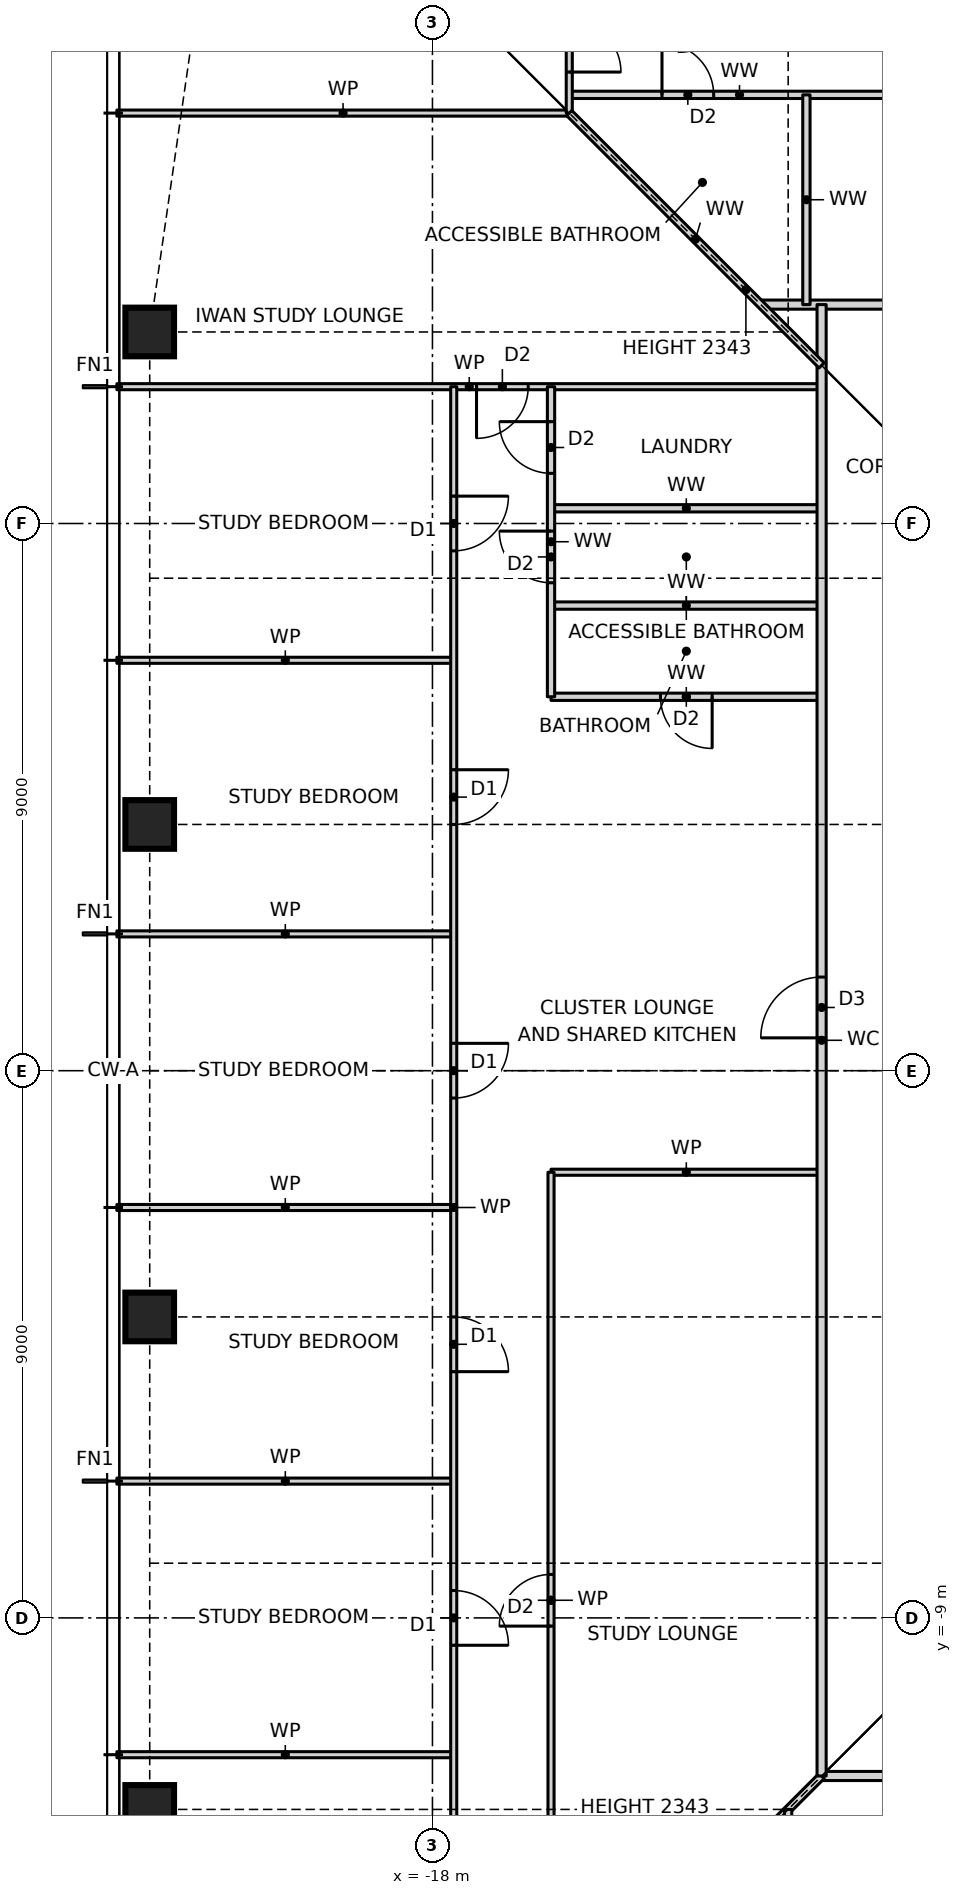
"""IFC4 building model, lengths in metres.
Left out: names, types, materials, properties, quantities, classifications, styles, units other than length and angle.
Written with IfcOpenShell. Run it as: python <this file> out.ifc"""

import sys

from ifc_helpers import new_model, si_unit, direction, frame, frame_2d, origin, origin_2d, place, context, subcontext, project, spatial, rectangle, hollow_rectangle, extrude, element, fill, save


model = new_model("IFC4")
c1 = context("Model", 3, precision=1e-05, world=origin(), true_north=direction((0.0, 1.0)))
c2 = subcontext(c1, "Body", "Model", "MODEL_VIEW")
j1 = project(units=[si_unit("LENGTHUNIT", "METRE"), si_unit("PLANEANGLEUNIT", "RADIAN")], contexts=[c1])
p1 = place(None, origin())
s1 = spatial("IfcSite", under=j1, at=p1, CompositionType="ELEMENT")
p2 = place(p1, origin())
s2 = spatial("IfcBuilding", under=s1, at=p2, CompositionType="ELEMENT")
p3 = place(p2, frame((0.0, 0.0, 36.0)))
s3 = spatial("IfcBuildingStorey", under=s2, at=p3, CompositionType="ELEMENT", Elevation=36.0)
for number, where, z_axis, x_axis in (
    (1, (-22.65, 12.15, 0.0), (0.0, 0.0, 1.0), (1.0, 0.0, 0.0)),
    (2, (-22.65, 4.05, 0.0), (0.0, 0.0, 1.0), (1.0, 0.0, 0.0)),
    (3, (-22.65, -4.05, 0.0), (0.0, 0.0, 1.0), (1.0, 0.0, 0.0)),
    (4, (-22.65, -12.15, 0.0), (0.0, 0.0, 1.0), (1.0, 0.0, 0.0)),
):
    element("IfcColumn", number, at=place(p3, frame(where, z_axis=z_axis, x_axis=x_axis)), inside=s3, PredefinedType="COLUMN", context=c2, shape_type="SweptSolid", body=[
        extrude(hollow_rectangle(XDim=0.8, YDim=0.8, WallThickness=0.09, at=origin_2d()), origin(), (0.0, 0.0, 1.0), 3.5),
    ])
p4 = place(p3, frame((-11.6, -11.6, 0.0), z_axis=(0.0, 0.0, 1.0), x_axis=(1.0, 0.0, 0.0)))
e5 = element("IfcWall", 5, at=p4, inside=s3, PredefinedType="PARTITIONING", context=c2, shape_type="SweptSolid", body=[
    extrude(rectangle(XDim=23.2, YDim=0.15, at=frame_2d((11.6, 0.0))), origin(), (0.0, 0.0, 1.0), 3.27),
])
p5 = place(p4, frame((2.975, 0.0, 0.0)))
e6 = element("IfcOpeningElement", 6, at=p5, cuts=e5, PredefinedType="OPENING", context=c2, shape_type="SweptSolid", body=[
    extrude(rectangle(XDim=1.0, YDim=2.1, at=frame_2d((0.5, 1.05))), frame((0.0, 0.085, 0.0), z_axis=(0.0, -1.0, 0.0), x_axis=(1.0, 0.0, 0.0)), (0.0, 0.0, 1.0), 0.17),
])
p6 = place(p4, frame((18.6, 0.0, 0.0)))
e7 = element("IfcOpeningElement", 7, at=p6, cuts=e5, PredefinedType="OPENING", context=c2, shape_type="SweptSolid", body=[
    extrude(rectangle(XDim=1.0, YDim=2.1, at=frame_2d((0.5, 1.05))), frame((0.0, 0.085, 0.0), z_axis=(0.0, -1.0, 0.0), x_axis=(1.0, 0.0, 0.0)), (0.0, 0.0, 1.0), 0.17),
])
for number, where, z_axis, x_axis in (
    (8, (-23.19, -11.25, 0.0), (0.0, 0.0, 1.0), (1.0, 0.0, 0.0)),
    (9, (-23.19, -6.75, 0.0), (0.0, 0.0, 1.0), (1.0, 0.0, 0.0)),
    (10, (-23.19, -2.25, 0.0), (0.0, 0.0, 1.0), (1.0, 0.0, 0.0)),
):
    element("IfcWall", number, at=place(p3, frame(where, z_axis=z_axis, x_axis=x_axis)), inside=s3, PredefinedType="PARTITIONING", context=c2, shape_type="SweptSolid", body=[
        extrude(rectangle(XDim=5.54, YDim=0.1, at=frame_2d((2.77, 0.0))), origin(), (0.0, 0.0, 1.0), 3.27),
    ])
p7 = place(p3, frame((-16.05, -1.67, 0.0), z_axis=(0.0, 0.0, 1.0), x_axis=(1.0, 0.0, 0.0)))
e11 = element("IfcWall", 11, at=p7, inside=s3, PredefinedType="PARTITIONING", context=c2, shape_type="SweptSolid", body=[
    extrude(rectangle(XDim=4.45, YDim=0.1, at=frame_2d((2.225, 0.0))), origin(), (0.0, 0.0, 1.0), 3.27),
])
p8 = place(p3, frame((-23.19, 2.25, 0.0), z_axis=(0.0, 0.0, 1.0), x_axis=(1.0, 0.0, 0.0)))
e12 = element("IfcWall", 12, at=p8, inside=s3, PredefinedType="PARTITIONING", context=c2, shape_type="SweptSolid", body=[
    extrude(rectangle(XDim=5.54, YDim=0.1, at=frame_2d((2.77, 0.0))), origin(), (0.0, 0.0, 1.0), 3.27),
])
p9 = place(p3, frame((-16.05, 6.15, 0.0), z_axis=(0.0, 0.0, 1.0), x_axis=(1.0, 0.0, 0.0)))
e13 = element("IfcWall", 13, at=p9, inside=s3, PredefinedType="PARTITIONING", context=c2, shape_type="SweptSolid", body=[
    extrude(rectangle(XDim=4.45, YDim=0.12, at=frame_2d((2.225, 0.0))), origin(), (0.0, 0.0, 1.0), 3.27),
])
p10 = place(p9, frame((1.8, 0.0, 0.0)))
e14 = element("IfcOpeningElement", 14, at=p10, cuts=e13, PredefinedType="OPENING", context=c2, shape_type="SweptSolid", body=[
    extrude(rectangle(XDim=0.85, YDim=2.1, at=frame_2d((0.425, 1.05))), frame((0.0, 0.07, 0.0), z_axis=(0.0, -1.0, 0.0), x_axis=(1.0, 0.0, 0.0)), (0.0, 0.0, 1.0), 0.14),
])
p11 = place(p3, frame((-23.19, 6.75, 0.0), z_axis=(0.0, 0.0, 1.0), x_axis=(1.0, 0.0, 0.0)))
e15 = element("IfcWall", 15, at=p11, inside=s3, PredefinedType="PARTITIONING", context=c2, shape_type="SweptSolid", body=[
    extrude(rectangle(XDim=5.54, YDim=0.1, at=frame_2d((2.77, 0.0))), origin(), (0.0, 0.0, 1.0), 3.27),
])
for number, where, z_axis, x_axis in (
    (16, (-16.05, 7.65, 0.0), (0.0, 0.0, 1.0), (1.0, 0.0, 0.0)),
    (17, (-16.05, 9.25, 0.0), (0.0, 0.0, 1.0), (1.0, 0.0, 0.0)),
):
    element("IfcWall", number, at=place(p3, frame(where, z_axis=z_axis, x_axis=x_axis)), inside=s3, PredefinedType="PARTITIONING", context=c2, shape_type="SweptSolid", body=[
        extrude(rectangle(XDim=4.45, YDim=0.12, at=frame_2d((2.225, 0.0))), origin(), (0.0, 0.0, 1.0), 3.27),
    ])
p12 = place(p3, frame((-23.19, 11.25, 0.0), z_axis=(0.0, 0.0, 1.0), x_axis=(1.0, 0.0, 0.0)))
e18 = element("IfcWall", 18, at=p12, inside=s3, PredefinedType="PARTITIONING", context=c2, shape_type="SweptSolid", body=[
    extrude(rectangle(XDim=11.59, YDim=0.1, at=frame_2d((5.795, 0.0))), origin(), (0.0, 0.0, 1.0), 3.27),
])
p13 = place(p12, frame((5.915, 0.0, 0.0)))
e19 = element("IfcOpeningElement", 19, at=p13, cuts=e18, PredefinedType="OPENING", context=c2, shape_type="SweptSolid", body=[
    extrude(rectangle(XDim=0.85, YDim=2.1, at=frame_2d((0.425, 1.05))), frame((0.0, 0.06, 0.0), z_axis=(0.0, -1.0, 0.0), x_axis=(1.0, 0.0, 0.0)), (0.0, 0.0, 1.0), 0.12),
])
p14 = place(p3, frame((-12.6, 12.6, 0.0), z_axis=(0.0, 0.0, 1.0), x_axis=(1.0, 0.0, 0.0)))
e20 = element("IfcWall", 20, at=p14, inside=s3, PredefinedType="PARTITIONING", context=c2, shape_type="SweptSolid", body=[
    extrude(rectangle(XDim=25.2, YDim=0.15, at=frame_2d((12.6, 0.0))), origin(), (0.0, 0.0, 1.0), 3.27),
])
p15 = place(p14, frame((3.15, 0.0, 0.0)))
e21 = element("IfcOpeningElement", 21, at=p15, cuts=e20, PredefinedType="OPENING", context=c2, shape_type="SweptSolid", body=[
    extrude(rectangle(XDim=1.0, YDim=2.1, at=frame_2d((0.5, 1.05))), frame((0.0, 0.085, 0.0), z_axis=(0.0, -1.0, 0.0), x_axis=(1.0, 0.0, 0.0)), (0.0, 0.0, 1.0), 0.17),
])
p16 = place(p3, frame((-23.19, 15.75, 0.0), z_axis=(0.0, 0.0, 1.0), x_axis=(1.0, 0.0, 0.0)))
e22 = element("IfcWall", 22, at=p16, inside=s3, PredefinedType="PARTITIONING", context=c2, shape_type="SweptSolid", body=[
    extrude(rectangle(XDim=7.44, YDim=0.1, at=frame_2d((3.72, 0.0))), origin(), (0.0, 0.0, 1.0), 3.27),
])
p17 = place(p3, frame((-15.75, 16.05, 0.0), z_axis=(0.0, 0.0, 1.0), x_axis=(1.0, 0.0, 0.0)))
e23 = element("IfcWall", 23, at=p17, inside=s3, PredefinedType="PARTITIONING", context=c2, shape_type="SweptSolid", body=[
    extrude(rectangle(XDim=5.6, YDim=0.12, at=frame_2d((2.8, 0.0))), origin(), (0.0, 0.0, 1.0), 3.27),
])
p18 = place(p17, frame((1.525, 0.0, 0.0)))
e24 = element("IfcOpeningElement", 24, at=p18, cuts=e23, PredefinedType="OPENING", context=c2, shape_type="SweptSolid", body=[
    extrude(rectangle(XDim=0.85, YDim=2.1, at=frame_2d((0.425, 1.05))), frame((0.0, 0.07, 0.0), z_axis=(0.0, -1.0, 0.0), x_axis=(1.0, 0.0, 0.0)), (0.0, 0.0, 1.0), 0.14),
])
p19 = place(p3, frame((-15.75, -15.75, 0.0), z_axis=(0.0, 0.0, 1.0), x_axis=(0.707106781187, 0.707106781187, 0.0)))
e25 = element("IfcWall", 25, at=p19, inside=s3, PredefinedType="PARTITIONING", context=c2, shape_type="SweptSolid", body=[
    extrude(rectangle(XDim=5.869, YDim=0.12, at=frame_2d((2.935, 0.0))), origin(), (0.0, 0.0, 1.0), 2.343),
])
p20 = place(p3, frame((-11.6, -11.6, 0.0), z_axis=(0.0, 0.0, 1.0), x_axis=(0.0, 1.0, 0.0)))
e26 = element("IfcWall", 26, at=p20, inside=s3, PredefinedType="PARTITIONING", context=c2, shape_type="SweptSolid", body=[
    extrude(rectangle(XDim=24.2, YDim=0.15, at=frame_2d((12.1, 0.0))), origin(), (0.0, 0.0, 1.0), 3.27),
])
p21 = place(p20, frame((12.14, 0.0, 0.0)))
e27 = element("IfcOpeningElement", 27, at=p21, cuts=e26, PredefinedType="OPENING", context=c2, shape_type="SweptSolid", body=[
    extrude(rectangle(XDim=1.0, YDim=2.1, at=frame_2d((0.5, 1.05))), frame((0.0, 0.085, 0.0), z_axis=(0.0, -1.0, 0.0), x_axis=(1.0, 0.0, 0.0)), (0.0, 0.0, 1.0), 0.17),
])
p22 = place(p3, frame((-11.85, 12.6, 0.0), z_axis=(0.0, 0.0, 1.0), x_axis=(0.0, 1.0, 0.0)))
e28 = element("IfcWall", 28, at=p22, inside=s3, PredefinedType="PARTITIONING", context=c2, shape_type="SweptSolid", body=[
    extrude(rectangle(XDim=3.45, YDim=0.12, at=frame_2d((1.725, 0.0))), origin(), (0.0, 0.0, 1.0), 3.27),
])
p23 = place(p3, frame((-12.15, -16.05, 0.0), z_axis=(0.0, 0.0, 1.0), x_axis=(0.0, 1.0, 0.0)))
e29 = element("IfcWall", 29, at=p23, inside=s3, PredefinedType="PARTITIONING", context=c2, shape_type="SweptSolid", body=[
    extrude(rectangle(XDim=3.9, YDim=0.12, at=frame_2d((1.95, 0.0))), origin(), (0.0, 0.0, 1.0), 2.508),
])
p24 = place(p23, frame((1.525, 0.0, 0.0)))
e30 = element("IfcOpeningElement", 30, at=p24, cuts=e29, PredefinedType="OPENING", context=c2, shape_type="SweptSolid", body=[
    extrude(rectangle(XDim=0.85, YDim=2.1, at=frame_2d((0.425, 1.05))), frame((0.0, 0.07, 0.0), z_axis=(0.0, -1.0, 0.0), x_axis=(1.0, 0.0, 0.0)), (0.0, 0.0, 1.0), 0.14),
])
p25 = place(p3, frame((-15.75, 15.75, 0.0), z_axis=(0.0, 0.0, 1.0), x_axis=(0.0, 1.0, 0.0)))
e31 = element("IfcWall", 31, at=p25, inside=s3, PredefinedType="PARTITIONING", context=c2, shape_type="SweptSolid", body=[
    extrude(rectangle(XDim=7.44, YDim=0.1, at=frame_2d((3.72, 0.0))), origin(), (0.0, 0.0, 1.0), 3.27),
])
p26 = place(p25, frame((0.675, 0.0, 0.0)))
e32 = element("IfcOpeningElement", 32, at=p26, cuts=e31, PredefinedType="OPENING", context=c2, shape_type="SweptSolid", body=[
    extrude(rectangle(XDim=0.85, YDim=2.1, at=frame_2d((0.425, 1.05))), frame((0.0, 0.06, 0.0), z_axis=(0.0, -1.0, 0.0), x_axis=(1.0, 0.0, 0.0)), (0.0, 0.0, 1.0), 0.12),
])
p27 = place(p3, frame((-16.05, -15.75, 0.0), z_axis=(0.0, 0.0, 1.0), x_axis=(0.0, 1.0, 0.0)))
e33 = element("IfcWall", 33, at=p27, inside=s3, PredefinedType="PARTITIONING", context=c2, shape_type="SweptSolid", body=[
    extrude(rectangle(XDim=14.08, YDim=0.1, at=frame_2d((7.04, 0.0))), origin(), (0.0, 0.0, 1.0), 3.27),
])
p28 = place(p27, frame((6.615, 0.0, 0.0)))
e34 = element("IfcOpeningElement", 34, at=p28, cuts=e33, PredefinedType="OPENING", context=c2, shape_type="SweptSolid", body=[
    extrude(rectangle(XDim=0.85, YDim=2.1, at=frame_2d((0.425, 1.05))), frame((0.0, 0.06, 0.0), z_axis=(0.0, -1.0, 0.0), x_axis=(1.0, 0.0, 0.0)), (0.0, 0.0, 1.0), 0.12),
])
p29 = place(p3, frame((-16.05, 6.15, 0.0), z_axis=(0.0, 0.0, 1.0), x_axis=(0.0, 1.0, 0.0)))
e35 = element("IfcWall", 35, at=p29, inside=s3, PredefinedType="PARTITIONING", context=c2, shape_type="SweptSolid", body=[
    extrude(rectangle(XDim=5.1, YDim=0.12, at=frame_2d((2.55, 0.0))), origin(), (0.0, 0.0, 1.0), 3.27),
])
p30 = place(p29, frame((3.675, 0.0, 0.0)))
e36 = element("IfcOpeningElement", 36, at=p30, cuts=e35, PredefinedType="OPENING", context=c2, shape_type="SweptSolid", body=[
    extrude(rectangle(XDim=0.85, YDim=2.1, at=frame_2d((0.425, 1.05))), frame((0.0, 0.07, 0.0), z_axis=(0.0, -1.0, 0.0), x_axis=(1.0, 0.0, 0.0)), (0.0, 0.0, 1.0), 0.14),
])
p31 = place(p29, frame((1.875, 0.0, 0.0)))
e37 = element("IfcOpeningElement", 37, at=p31, cuts=e35, PredefinedType="OPENING", context=c2, shape_type="SweptSolid", body=[
    extrude(rectangle(XDim=0.85, YDim=2.1, at=frame_2d((0.425, 1.05))), frame((0.0, 0.07, 0.0), z_axis=(0.0, -1.0, 0.0), x_axis=(1.0, 0.0, 0.0)), (0.0, 0.0, 1.0), 0.14),
])
p32 = place(p3, frame((-17.65, -15.75, 0.0), z_axis=(0.0, 0.0, 1.0), x_axis=(0.0, 1.0, 0.0)))
e38 = element("IfcWall", 38, at=p32, inside=s3, PredefinedType="PARTITIONING", context=c2, shape_type="SweptSolid", body=[
    extrude(rectangle(XDim=27.0, YDim=0.1, at=frame_2d((13.5, 0.0))), origin(), (0.0, 0.0, 1.0), 3.27),
])
p33 = place(p32, frame((24.3, 0.0, 0.0)))
e39 = element("IfcOpeningElement", 39, at=p33, cuts=e38, PredefinedType="OPENING", context=c2, shape_type="SweptSolid", body=[
    extrude(rectangle(XDim=0.9, YDim=2.1, at=frame_2d((0.45, 1.05))), frame((0.0, 0.06, 0.0), z_axis=(0.0, -1.0, 0.0), x_axis=(1.0, 0.0, 0.0)), (0.0, 0.0, 1.0), 0.12),
])
p34 = place(p32, frame((19.8, 0.0, 0.0)))
e40 = element("IfcOpeningElement", 40, at=p34, cuts=e38, PredefinedType="OPENING", context=c2, shape_type="SweptSolid", body=[
    extrude(rectangle(XDim=0.9, YDim=2.1, at=frame_2d((0.45, 1.05))), frame((0.0, 0.06, 0.0), z_axis=(0.0, -1.0, 0.0), x_axis=(1.0, 0.0, 0.0)), (0.0, 0.0, 1.0), 0.12),
])
p35 = place(p32, frame((15.3, 0.0, 0.0)))
e41 = element("IfcOpeningElement", 41, at=p35, cuts=e38, PredefinedType="OPENING", context=c2, shape_type="SweptSolid", body=[
    extrude(rectangle(XDim=0.9, YDim=2.1, at=frame_2d((0.45, 1.05))), frame((0.0, 0.06, 0.0), z_axis=(0.0, -1.0, 0.0), x_axis=(1.0, 0.0, 0.0)), (0.0, 0.0, 1.0), 0.12),
])
p36 = place(p32, frame((10.8, 0.0, 0.0)))
e42 = element("IfcOpeningElement", 42, at=p36, cuts=e38, PredefinedType="OPENING", context=c2, shape_type="SweptSolid", body=[
    extrude(rectangle(XDim=0.9, YDim=2.1, at=frame_2d((0.45, 1.05))), frame((0.0, 0.06, 0.0), z_axis=(0.0, -1.0, 0.0), x_axis=(1.0, 0.0, 0.0)), (0.0, 0.0, 1.0), 0.12),
])
p37 = place(p32, frame((6.3, 0.0, 0.0)))
e43 = element("IfcOpeningElement", 43, at=p37, cuts=e38, PredefinedType="OPENING", context=c2, shape_type="SweptSolid", body=[
    extrude(rectangle(XDim=0.9, YDim=2.1, at=frame_2d((0.45, 1.05))), frame((0.0, 0.06, 0.0), z_axis=(0.0, -1.0, 0.0), x_axis=(1.0, 0.0, 0.0)), (0.0, 0.0, 1.0), 0.12),
])
p38 = place(p32, frame((1.8, 0.0, 0.0)))
e44 = element("IfcOpeningElement", 44, at=p38, cuts=e38, PredefinedType="OPENING", context=c2, shape_type="SweptSolid", body=[
    extrude(rectangle(XDim=0.9, YDim=2.1, at=frame_2d((0.45, 1.05))), frame((0.0, 0.06, 0.0), z_axis=(0.0, -1.0, 0.0), x_axis=(1.0, 0.0, 0.0)), (0.0, 0.0, 1.0), 0.12),
])
p39 = place(p3, frame((-11.6, 11.6, 0.0), z_axis=(0.0, 0.0, 1.0), x_axis=(-0.707106781187, 0.707106781187, 0.0)))
e45 = element("IfcWall", 45, at=p39, inside=s3, PredefinedType="PARTITIONING", context=c2, shape_type="SweptSolid", body=[
    extrude(rectangle(XDim=5.869, YDim=0.12, at=frame_2d((2.935, 0.0))), origin(), (0.0, 0.0, 1.0), 2.343),
])
p40 = place(p18, origin())
e46 = element("IfcDoor", 46, at=p40, inside=s3, OperationType="SINGLE_SWING_LEFT", PredefinedType="DOOR", context=c2, shape_type="SweptSolid", body=[
    extrude(rectangle(XDim=0.85, YDim=2.1, at=frame_2d((0.425, 1.05))), frame((0.0, 0.025, 0.0), z_axis=(0.0, -1.0, 0.0), x_axis=(1.0, 0.0, 0.0)), (0.0, 0.0, 1.0), 0.05),
])
fill(e24, e46)
p41 = place(p13, frame((0.85, 0.0, 0.0), z_axis=(0.0, 0.0, 1.0), x_axis=(-1.0, 0.0, 0.0)))
e47 = element("IfcDoor", 47, at=p41, inside=s3, OperationType="SINGLE_SWING_RIGHT", PredefinedType="DOOR", context=c2, shape_type="SweptSolid", body=[
    extrude(rectangle(XDim=0.85, YDim=2.1, at=frame_2d((0.425, 1.05))), frame((0.0, 0.025, 0.0), z_axis=(0.0, -1.0, 0.0), x_axis=(1.0, 0.0, 0.0)), (0.0, 0.0, 1.0), 0.05),
])
fill(e19, e47)
p42 = place(p33, frame((0.9, 0.0, 0.0), z_axis=(0.0, 0.0, 1.0), x_axis=(-1.0, 0.0, 0.0)))
e48 = element("IfcDoor", 48, at=p42, inside=s3, OperationType="SINGLE_SWING_LEFT", PredefinedType="DOOR", context=c2, shape_type="SweptSolid", body=[
    extrude(rectangle(XDim=0.9, YDim=2.1, at=frame_2d((0.45, 1.05))), frame((0.0, 0.025, 0.0), z_axis=(0.0, -1.0, 0.0), x_axis=(1.0, 0.0, 0.0)), (0.0, 0.0, 1.0), 0.05),
])
fill(e39, e48)
p43 = place(p34, frame((0.9, 0.0, 0.0), z_axis=(0.0, 0.0, 1.0), x_axis=(-1.0, 0.0, 0.0)))
e49 = element("IfcDoor", 49, at=p43, inside=s3, OperationType="SINGLE_SWING_LEFT", PredefinedType="DOOR", context=c2, shape_type="SweptSolid", body=[
    extrude(rectangle(XDim=0.9, YDim=2.1, at=frame_2d((0.45, 1.05))), frame((0.0, 0.025, 0.0), z_axis=(0.0, -1.0, 0.0), x_axis=(1.0, 0.0, 0.0)), (0.0, 0.0, 1.0), 0.05),
])
fill(e40, e49)
p44 = place(p35, frame((0.9, 0.0, 0.0), z_axis=(0.0, 0.0, 1.0), x_axis=(-1.0, 0.0, 0.0)))
e50 = element("IfcDoor", 50, at=p44, inside=s3, OperationType="SINGLE_SWING_LEFT", PredefinedType="DOOR", context=c2, shape_type="SweptSolid", body=[
    extrude(rectangle(XDim=0.9, YDim=2.1, at=frame_2d((0.45, 1.05))), frame((0.0, 0.025, 0.0), z_axis=(0.0, -1.0, 0.0), x_axis=(1.0, 0.0, 0.0)), (0.0, 0.0, 1.0), 0.05),
])
fill(e41, e50)
p45 = place(p36, frame((0.9, 0.0, 0.0), z_axis=(0.0, 0.0, 1.0), x_axis=(-1.0, 0.0, 0.0)))
e51 = element("IfcDoor", 51, at=p45, inside=s3, OperationType="SINGLE_SWING_RIGHT", PredefinedType="DOOR", context=c2, shape_type="SweptSolid", body=[
    extrude(rectangle(XDim=0.9, YDim=2.1, at=frame_2d((0.45, 1.05))), frame((0.0, 0.025, 0.0), z_axis=(0.0, -1.0, 0.0), x_axis=(1.0, 0.0, 0.0)), (0.0, 0.0, 1.0), 0.05),
])
fill(e42, e51)
p46 = place(p37, frame((0.9, 0.0, 0.0), z_axis=(0.0, 0.0, 1.0), x_axis=(-1.0, 0.0, 0.0)))
e52 = element("IfcDoor", 52, at=p46, inside=s3, OperationType="SINGLE_SWING_RIGHT", PredefinedType="DOOR", context=c2, shape_type="SweptSolid", body=[
    extrude(rectangle(XDim=0.9, YDim=2.1, at=frame_2d((0.45, 1.05))), frame((0.0, 0.025, 0.0), z_axis=(0.0, -1.0, 0.0), x_axis=(1.0, 0.0, 0.0)), (0.0, 0.0, 1.0), 0.05),
])
fill(e43, e52)
p47 = place(p21, origin())
e53 = element("IfcDoor", 53, at=p47, inside=s3, OperationType="SINGLE_SWING_LEFT", PredefinedType="DOOR", context=c2, shape_type="SweptSolid", body=[
    extrude(rectangle(XDim=1.0, YDim=2.1, at=frame_2d((0.5, 1.05))), frame((0.0, 0.025, 0.0), z_axis=(0.0, -1.0, 0.0), x_axis=(1.0, 0.0, 0.0)), (0.0, 0.0, 1.0), 0.05),
])
fill(e27, e53)
p48 = place(p30, origin())
e54 = element("IfcDoor", 54, at=p48, inside=s3, OperationType="SINGLE_SWING_RIGHT", PredefinedType="DOOR", context=c2, shape_type="SweptSolid", body=[
    extrude(rectangle(XDim=0.85, YDim=2.1, at=frame_2d((0.425, 1.05))), frame((0.0, 0.025, 0.0), z_axis=(0.0, -1.0, 0.0), x_axis=(1.0, 0.0, 0.0)), (0.0, 0.0, 1.0), 0.05),
])
fill(e36, e54)
p49 = place(p31, origin())
e55 = element("IfcDoor", 55, at=p49, inside=s3, OperationType="SINGLE_SWING_RIGHT", PredefinedType="DOOR", context=c2, shape_type="SweptSolid", body=[
    extrude(rectangle(XDim=0.85, YDim=2.1, at=frame_2d((0.425, 1.05))), frame((0.0, 0.025, 0.0), z_axis=(0.0, -1.0, 0.0), x_axis=(1.0, 0.0, 0.0)), (0.0, 0.0, 1.0), 0.05),
])
fill(e37, e55)
p50 = place(p10, frame((0.85, 0.0, 0.0), z_axis=(0.0, 0.0, 1.0), x_axis=(-1.0, 0.0, 0.0)))
e56 = element("IfcDoor", 56, at=p50, inside=s3, OperationType="SINGLE_SWING_LEFT", PredefinedType="DOOR", context=c2, shape_type="SweptSolid", body=[
    extrude(rectangle(XDim=0.85, YDim=2.1, at=frame_2d((0.425, 1.05))), frame((0.0, 0.025, 0.0), z_axis=(0.0, -1.0, 0.0), x_axis=(1.0, 0.0, 0.0)), (0.0, 0.0, 1.0), 0.05),
])
fill(e14, e56)
p51 = place(p28, origin())
e57 = element("IfcDoor", 57, at=p51, inside=s3, OperationType="SINGLE_SWING_LEFT", PredefinedType="DOOR", context=c2, shape_type="SweptSolid", body=[
    extrude(rectangle(XDim=0.85, YDim=2.1, at=frame_2d((0.425, 1.05))), frame((0.0, 0.025, 0.0), z_axis=(0.0, -1.0, 0.0), x_axis=(1.0, 0.0, 0.0)), (0.0, 0.0, 1.0), 0.05),
])
fill(e34, e57)
p52 = place(p26, frame((0.85, 0.0, 0.0), z_axis=(0.0, 0.0, 1.0), x_axis=(-1.0, 0.0, 0.0)))
e58 = element("IfcDoor", 58, at=p52, inside=s3, OperationType="SINGLE_SWING_RIGHT", PredefinedType="DOOR", context=c2, shape_type="SweptSolid", body=[
    extrude(rectangle(XDim=0.85, YDim=2.1, at=frame_2d((0.425, 1.05))), frame((0.0, 0.025, 0.0), z_axis=(0.0, -1.0, 0.0), x_axis=(1.0, 0.0, 0.0)), (0.0, 0.0, 1.0), 0.05),
])
fill(e32, e58)
save(model, sys.argv[1])
